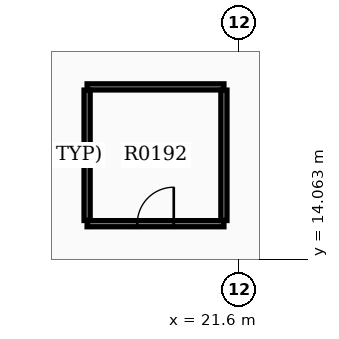
"""IFC4 building model, lengths in metres.
Left out: names, types, materials, properties, quantities, classifications, styles, units other than length and angle.
Written with IfcOpenShell. Run it as: python <this file> out.ifc"""

import sys

from ifc_helpers import new_model, si_unit, direction, frame, frame_2d, origin, place, context, subcontext, project, spatial, rectangle, extrude, element, fill, save


model = new_model("IFC4")
c1 = context("Model", 3, precision=1e-05, world=origin(), true_north=direction((0.0, 1.0)))
c2 = subcontext(c1, "Body", "Model", "MODEL_VIEW")
j1 = project(units=[si_unit("LENGTHUNIT", "METRE"), si_unit("PLANEANGLEUNIT", "RADIAN")], contexts=[c1])
p1 = place(None, origin())
s1 = spatial("IfcSite", under=j1, at=p1, CompositionType="ELEMENT")
p2 = place(p1, origin())
s2 = spatial("IfcBuilding", under=s1, at=p2, CompositionType="ELEMENT")
p3 = place(p2, frame((0.0, 0.0, 10.2)))
s3 = spatial("IfcBuildingStorey", under=s2, at=p3, CompositionType="ELEMENT", Elevation=10.2)
p4 = place(p3, frame((17.6, 15.0, 0.0), z_axis=(0.0, 0.0, 1.0), x_axis=(1.0, 0.0, 0.0)))
e1 = element("IfcWall", 1, at=p4, inside=s3, PredefinedType="PARTITIONING", context=c2, shape_type="SweptSolid", body=[
    extrude(rectangle(XDim=3.6, YDim=0.16, at=frame_2d((1.8, 0.0))), origin(), (0.0, 0.0, 1.0), 3.32),
])
p5 = place(p4, frame((1.32, 0.0, 0.0)))
e2 = element("IfcOpeningElement", 2, at=p5, cuts=e1, PredefinedType="OPENING", context=c2, shape_type="SweptSolid", body=[
    extrude(rectangle(XDim=0.96, YDim=2.15, at=frame_2d((0.48, 1.075))), frame((0.0, 0.09, 0.0), z_axis=(0.0, -1.0, 0.0), x_axis=(1.0, 0.0, 0.0)), (0.0, 0.0, 1.0), 0.18),
])
p6 = place(p3, frame((17.6, 18.6, 0.0), z_axis=(0.0, 0.0, 1.0), x_axis=(1.0, 0.0, 0.0)))
e3 = element("IfcWall", 3, at=p6, inside=s3, PredefinedType="PARTITIONING", context=c2, shape_type="SweptSolid", body=[
    extrude(rectangle(XDim=3.6, YDim=0.16, at=frame_2d((1.8, 0.0))), origin(), (0.0, 0.0, 1.0), 3.32),
])
for number, where, z_axis, x_axis in (
    (4, (17.6, 15.085, 0.0), (0.0, 0.0, 1.0), (0.0, 1.0, 0.0)),
    (5, (21.2, 15.085, 0.0), (0.0, 0.0, 1.0), (0.0, 1.0, 0.0)),
):
    element("IfcWall", number, at=place(p3, frame(where, z_axis=z_axis, x_axis=x_axis)), inside=s3, PredefinedType="PARTITIONING", context=c2, shape_type="SweptSolid", body=[
        extrude(rectangle(XDim=3.43, YDim=0.16, at=frame_2d((1.715, 0.0))), origin(), (0.0, 0.0, 1.0), 3.32),
    ])
p7 = place(p5, origin())
e6 = element("IfcDoor", 6, at=p7, inside=s3, OperationType="SINGLE_SWING_RIGHT", PredefinedType="DOOR", context=c2, shape_type="SweptSolid", body=[
    extrude(rectangle(XDim=0.96, YDim=2.15, at=frame_2d((0.48, 1.075))), frame((0.0, 0.025, 0.0), z_axis=(0.0, -1.0, 0.0), x_axis=(1.0, 0.0, 0.0)), (0.0, 0.0, 1.0), 0.05),
])
fill(e2, e6)
save(model, sys.argv[1])
